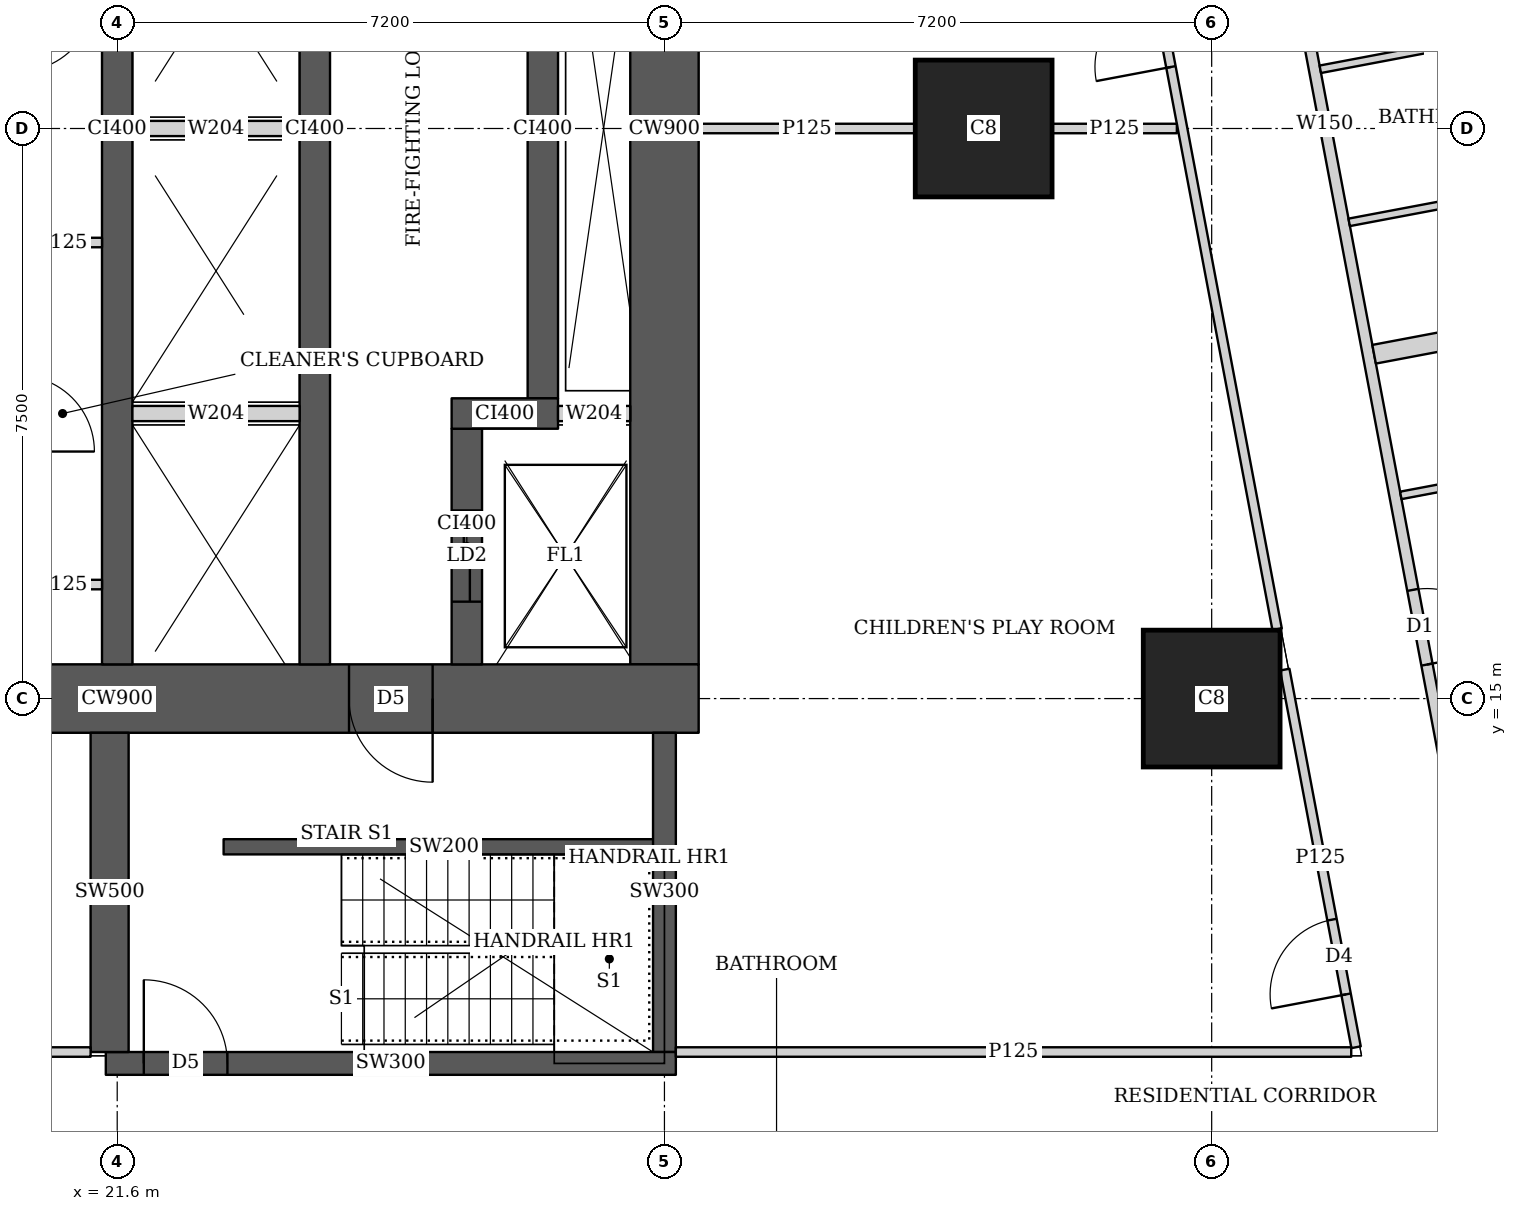
"""IFC4 building model, lengths in metres.
Left out: names, types, materials, properties, quantities, classifications, styles, units other than length and angle.
Written with IfcOpenShell. Run it as: python <this file> out.ifc"""

import sys

from ifc_helpers import new_model, si_unit, direction, frame, frame_2d, origin, origin_2d, place, context, subcontext, project, spatial, rectangle, extrude, element, fill, save


model = new_model("IFC4")
c1 = context("Model", 3, precision=1e-05, world=origin(), true_north=direction((0.0, 1.0)))
c2 = subcontext(c1, "Body", "Model", "MODEL_VIEW")
j1 = project(units=[si_unit("LENGTHUNIT", "METRE"), si_unit("PLANEANGLEUNIT", "RADIAN")], contexts=[c1])
p1 = place(None, origin())
s1 = spatial("IfcSite", under=j1, at=p1, CompositionType="ELEMENT")
p2 = place(p1, origin())
s2 = spatial("IfcBuilding", under=s1, at=p2, CompositionType="ELEMENT")
p3 = place(p2, frame((0.0, 0.0, 68.75)))
s3 = spatial("IfcBuildingStorey", under=s2, at=p3, CompositionType="ELEMENT", Elevation=68.75)
for number, where, z_axis, x_axis in (
    (1, (36.0, 15.0, 0.0), (0.0, 0.0, 1.0), (1.0, 0.0, 0.0)),
    (2, (33.0, 22.5, 0.0), (0.0, 0.0, 1.0), (1.0, 0.0, 0.0)),
):
    element("IfcColumn", number, at=place(p3, frame(where, z_axis=z_axis, x_axis=x_axis)), inside=s3, PredefinedType="COLUMN", context=c2, shape_type="SweptSolid", body=[
        extrude(rectangle(XDim=1.8, YDim=1.8, at=origin_2d()), origin(), (0.0, 0.0, 1.0), 3.75),
    ])
p4 = place(p3, frame((13.95, 15.0, 0.0), z_axis=(0.0, 0.0, 1.0), x_axis=(1.0, 0.0, 0.0)))
e3 = element("IfcWall", 3, at=p4, inside=s3, PredefinedType="SHEAR", context=c2, shape_type="SweptSolid", body=[
    extrude(rectangle(XDim=15.3, YDim=0.9, at=frame_2d((7.65, 0.0))), origin(), (0.0, 0.0, 1.0), 3.75),
])
p5 = place(p4, frame((4.45, 0.0, 0.0)))
e4 = element("IfcOpeningElement", 4, at=p5, cuts=e3, PredefinedType="OPENING", context=c2, shape_type="SweptSolid", body=[
    extrude(rectangle(XDim=1.8, YDim=2.1, at=frame_2d((0.9, 1.05))), frame((0.0, 0.46, 0.0), z_axis=(0.0, -1.0, 0.0), x_axis=(1.0, 0.0, 0.0)), (0.0, 0.0, 1.0), 0.92),
])
p6 = place(p4, frame((10.7, 0.0, 0.0)))
e5 = element("IfcOpeningElement", 5, at=p6, cuts=e3, PredefinedType="OPENING", context=c2, shape_type="SweptSolid", body=[
    extrude(rectangle(XDim=1.1, YDim=2.1, at=frame_2d((0.55, 1.05))), frame((0.0, 0.46, 0.0), z_axis=(0.0, -1.0, 0.0), x_axis=(1.0, 0.0, 0.0)), (0.0, 0.0, 1.0), 0.92),
])
p7 = place(p3, frame((28.8, 15.45, 0.0), z_axis=(0.0, 0.0, 1.0), x_axis=(0.0, 1.0, 0.0)))
e6 = element("IfcWall", 6, at=p7, inside=s3, PredefinedType="SHEAR", context=c2, shape_type="SweptSolid", body=[
    extrude(rectangle(XDim=14.1, YDim=0.9, at=frame_2d((7.05, 0.0))), origin(), (0.0, 0.0, 1.0), 3.75),
])
for number, where, z_axis, x_axis in (
    (7, (21.6, 15.45, 0.0), (0.0, 0.0, 1.0), (0.0, 1.0, 0.0)),
    (8, (24.2, 15.45, 0.0), (0.0, 0.0, 1.0), (0.0, 1.0, 0.0)),
):
    element("IfcWall", number, at=place(p3, frame(where, z_axis=z_axis, x_axis=x_axis)), inside=s3, PredefinedType="SHEAR", context=c2, shape_type="SweptSolid", body=[
        extrude(rectangle(XDim=14.1, YDim=0.4, at=frame_2d((7.05, 0.0))), origin(), (0.0, 0.0, 1.0), 3.75),
    ])
p8 = place(p3, frame((26.2, 15.45, 0.0), z_axis=(0.0, 0.0, 1.0), x_axis=(0.0, 1.0, 0.0)))
e9 = element("IfcWall", 9, at=p8, inside=s3, PredefinedType="SHEAR", context=c2, shape_type="SweptSolid", body=[
    extrude(rectangle(XDim=3.1, YDim=0.4, at=frame_2d((1.55, 0.0))), origin(), (0.0, 0.0, 1.0), 3.75),
])
p9 = place(p8, frame((0.825, 0.0, 0.0)))
e10 = element("IfcOpeningElement", 10, at=p9, cuts=e9, PredefinedType="OPENING", context=c2, shape_type="SweptSolid", body=[
    extrude(rectangle(XDim=1.2, YDim=2.1, at=frame_2d((0.6, 1.05))), frame((0.0, 0.21, 0.0), z_axis=(0.0, -1.0, 0.0), x_axis=(1.0, 0.0, 0.0)), (0.0, 0.0, 1.0), 0.42),
])
p10 = place(p3, frame((26.0, 18.75, 0.0), z_axis=(0.0, 0.0, 1.0), x_axis=(1.0, 0.0, 0.0)))
e11 = element("IfcWall", 11, at=p10, inside=s3, PredefinedType="SHEAR", context=c2, shape_type="SweptSolid", body=[
    extrude(rectangle(XDim=1.4, YDim=0.4, at=frame_2d((0.7, 0.0))), origin(), (0.0, 0.0, 1.0), 3.75),
])
p11 = place(p3, frame((27.2, 18.95, 0.0), z_axis=(0.0, 0.0, 1.0), x_axis=(0.0, 1.0, 0.0)))
e12 = element("IfcWall", 12, at=p11, inside=s3, PredefinedType="SHEAR", context=c2, shape_type="SweptSolid", body=[
    extrude(rectangle(XDim=7.1, YDim=0.4, at=frame_2d((3.55, 0.0))), origin(), (0.0, 0.0, 1.0), 3.75),
])
p12 = place(p3, frame((21.45, 10.2, 0.0), z_axis=(0.0, 0.0, 1.0), x_axis=(1.0, 0.0, 0.0)))
e13 = element("IfcWall", 13, at=p12, inside=s3, PredefinedType="SHEAR", context=c2, shape_type="SweptSolid", body=[
    extrude(rectangle(XDim=7.5, YDim=0.3, at=frame_2d((3.75, 0.0))), origin(), (0.0, 0.0, 1.0), 3.75),
])
p13 = place(p12, frame((0.5, 0.0, 0.0)))
e14 = element("IfcOpeningElement", 14, at=p13, cuts=e13, PredefinedType="OPENING", context=c2, shape_type="SweptSolid", body=[
    extrude(rectangle(XDim=1.1, YDim=2.1, at=frame_2d((0.55, 1.05))), frame((0.0, 0.16, 0.0), z_axis=(0.0, -1.0, 0.0), x_axis=(1.0, 0.0, 0.0)), (0.0, 0.0, 1.0), 0.32),
])
p14 = place(p3, frame((21.5, 10.35, 0.0), z_axis=(0.0, 0.0, 1.0), x_axis=(0.0, 1.0, 0.0)))
e15 = element("IfcWall", 15, at=p14, inside=s3, PredefinedType="SHEAR", context=c2, shape_type="SweptSolid", body=[
    extrude(rectangle(XDim=4.2, YDim=0.5, at=frame_2d((2.1, 0.0))), origin(), (0.0, 0.0, 1.0), 3.75),
])
p15 = place(p3, frame((28.8, 10.35, 0.0), z_axis=(0.0, 0.0, 1.0), x_axis=(0.0, 1.0, 0.0)))
e16 = element("IfcWall", 16, at=p15, inside=s3, PredefinedType="SHEAR", context=c2, shape_type="SweptSolid", body=[
    extrude(rectangle(XDim=4.2, YDim=0.3, at=frame_2d((2.1, 0.0))), origin(), (0.0, 0.0, 1.0), 3.75),
])
p16 = place(p3, frame((33.68, 42.723, 0.0), z_axis=(0.0, 0.0, 1.0), x_axis=(0.185624129307, -0.98262082342, 0.0)))
e17 = element("IfcWall", 17, at=p16, inside=s3, PredefinedType="SOLIDWALL", context=c2, shape_type="SweptSolid", body=[
    extrude(rectangle(XDim=41.051, YDim=0.15, at=frame_2d((20.526, 0.0))), origin(), (0.0, 0.0, 1.0), 2.45),
])
p17 = place(p16, frame((13.577, 0.0, 0.0)))
e18 = element("IfcOpeningElement", 18, at=p17, cuts=e17, PredefinedType="OPENING", context=c2, shape_type="SweptSolid", body=[
    extrude(rectangle(XDim=1.0, YDim=2.1, at=frame_2d((0.5, 1.05))), frame((0.0, 0.085, 0.0), z_axis=(0.0, -1.0, 0.0), x_axis=(1.0, 0.0, 0.0)), (0.0, 0.0, 1.0), 0.17),
])
p18 = place(p16, frame((17.394, 0.0, 0.0)))
e19 = element("IfcOpeningElement", 19, at=p18, cuts=e17, PredefinedType="OPENING", context=c2, shape_type="SweptSolid", body=[
    extrude(rectangle(XDim=1.0, YDim=2.1, at=frame_2d((0.5, 1.05))), frame((0.0, 0.085, 0.0), z_axis=(0.0, -1.0, 0.0), x_axis=(1.0, 0.0, 0.0)), (0.0, 0.0, 1.0), 0.17),
])
p19 = place(p16, frame((26.758, 0.0, 0.0)))
e20 = element("IfcOpeningElement", 20, at=p19, cuts=e17, PredefinedType="OPENING", context=c2, shape_type="SweptSolid", body=[
    extrude(rectangle(XDim=1.0, YDim=2.1, at=frame_2d((0.5, 1.05))), frame((0.0, 0.085, 0.0), z_axis=(0.0, -1.0, 0.0), x_axis=(1.0, 0.0, 0.0)), (0.0, 0.0, 1.0), 0.17),
])
p20 = place(p16, frame((32.193, 0.0, 0.0)))
e21 = element("IfcOpeningElement", 21, at=p20, cuts=e17, PredefinedType="OPENING", context=c2, shape_type="SweptSolid", body=[
    extrude(rectangle(XDim=1.0, YDim=2.1, at=frame_2d((0.5, 1.05))), frame((0.0, 0.085, 0.0), z_axis=(0.0, -1.0, 0.0), x_axis=(1.0, 0.0, 0.0)), (0.0, 0.0, 1.0), 0.17),
])
p21 = place(p3, frame((40.893, 23.934, 0.0), z_axis=(0.0, 0.0, 1.0), x_axis=(-0.982588017646, -0.185797706064, 0.0)))
e22 = element("IfcWall", 22, at=p21, inside=s3, PredefinedType="PARTITIONING", context=c2, shape_type="SweptSolid", body=[
    extrude(rectangle(XDim=3.525, YDim=0.1, at=frame_2d((1.763, 0.0))), origin(), (0.0, 0.0, 1.0), 3.45),
])
p22 = place(p3, frame((41.273, 21.919, 0.0), z_axis=(0.0, 0.0, 1.0), x_axis=(-0.982636169624, -0.185542874149, 0.0)))
e23 = element("IfcWall", 23, at=p22, inside=s3, PredefinedType="PARTITIONING", context=c2, shape_type="SweptSolid", body=[
    extrude(rectangle(XDim=3.525, YDim=0.1, at=frame_2d((1.763, 0.0))), origin(), (0.0, 0.0, 1.0), 2.45),
])
p23 = place(p3, frame((41.952, 18.327, 0.0), z_axis=(0.0, 0.0, 1.0), x_axis=(-0.982648794755, -0.185475998897, 0.0)))
e24 = element("IfcWall", 24, at=p23, inside=s3, PredefinedType="PARTITIONING", context=c2, shape_type="SweptSolid", body=[
    extrude(rectangle(XDim=3.525, YDim=0.1, at=frame_2d((1.763, 0.0))), origin(), (0.0, 0.0, 1.0), 3.45),
])
p24 = place(p3, frame((42.829, 20.416, 0.0), z_axis=(0.0, 0.0, 1.0), x_axis=(-0.982635807605, -0.185544791394, 0.0)))
e25 = element("IfcWall", 25, at=p24, inside=s3, PredefinedType="SOLIDWALL", context=c2, shape_type="SweptSolid", body=[
    extrude(rectangle(XDim=4.775, YDim=0.25, at=frame_2d((2.388, 0.0))), origin(), (0.0, 0.0, 1.0), 3.45),
])
p25 = place(p3, frame((10.413, 10.35, 0.0), z_axis=(0.0, 0.0, 1.0), x_axis=(1.0, 0.0, 0.0)))
e26 = element("IfcWall", 26, at=p25, inside=s3, PredefinedType="PARTITIONING", context=c2, shape_type="SweptSolid", body=[
    extrude(rectangle(XDim=10.837, YDim=0.125, at=frame_2d((5.418, 0.0))), origin(), (0.0, 0.0, 1.0), 3.45),
])
p26 = place(p25, frame((7.582, 0.0, 0.0)))
e27 = element("IfcOpeningElement", 27, at=p26, cuts=e26, PredefinedType="OPENING", context=c2, shape_type="SweptSolid", body=[
    extrude(rectangle(XDim=1.8, YDim=2.1, at=frame_2d((0.9, 1.05))), frame((0.0, 0.073, 0.0), z_axis=(0.0, -1.0, 0.0), x_axis=(1.0, 0.0, 0.0)), (0.0, 0.0, 1.0), 0.145),
])
p27 = place(p3, frame((28.95, 10.35, 0.0), z_axis=(0.0, 0.0, 1.0), x_axis=(1.0, 0.0, 0.0)))
e28 = element("IfcWall", 28, at=p27, inside=s3, PredefinedType="PARTITIONING", context=c2, shape_type="SweptSolid", body=[
    extrude(rectangle(XDim=8.886, YDim=0.125, at=frame_2d((4.443, 0.0))), origin(), (0.0, 0.0, 1.0), 3.45),
])
p28 = place(p3, frame((37.9, 10.413, 0.0), z_axis=(0.0, 0.0, 1.0), x_axis=(-0.185527510388, 0.982639070508, 0.0)))
e29 = element("IfcWall", 29, at=p28, inside=s3, PredefinedType="PARTITIONING", context=c2, shape_type="SweptSolid", body=[
    extrude(rectangle(XDim=5.056, YDim=0.125, at=frame_2d((2.528, 0.0))), origin(), (0.0, 0.0, 1.0), 3.45),
])
p29 = place(p28, frame((0.708, 0.0, 0.0)))
e30 = element("IfcOpeningElement", 30, at=p29, cuts=e29, PredefinedType="OPENING", context=c2, shape_type="SweptSolid", body=[
    extrude(rectangle(XDim=1.0, YDim=2.1, at=frame_2d((0.5, 1.05))), frame((0.0, 0.073, 0.0), z_axis=(0.0, -1.0, 0.0), x_axis=(1.0, 0.0, 0.0)), (0.0, 0.0, 1.0), 0.145),
])
p30 = place(p3, frame((36.861, 15.913, 0.0), z_axis=(0.0, 0.0, 1.0), x_axis=(-0.185588307143, 0.982627589808, 0.0)))
e31 = element("IfcWall", 31, at=p30, inside=s3, PredefinedType="PARTITIONING", context=c2, shape_type="SweptSolid", body=[
    extrude(rectangle(XDim=19.005, YDim=0.125, at=frame_2d((9.502, 0.0))), origin(), (0.0, 0.0, 1.0), 2.45),
])
p31 = place(p30, frame((7.527, 0.0, 0.0)))
e32 = element("IfcOpeningElement", 32, at=p31, cuts=e31, PredefinedType="OPENING", context=c2, shape_type="SweptSolid", body=[
    extrude(rectangle(XDim=1.0, YDim=2.1, at=frame_2d((0.5, 1.05))), frame((0.0, 0.073, 0.0), z_axis=(0.0, -1.0, 0.0), x_axis=(1.0, 0.0, 0.0)), (0.0, 0.0, 1.0), 0.145),
])
p32 = place(p30, frame((15.5, 0.0, 0.0)))
e33 = element("IfcOpeningElement", 33, at=p32, cuts=e31, PredefinedType="OPENING", context=c2, shape_type="SweptSolid", body=[
    extrude(rectangle(XDim=1.0, YDim=2.1, at=frame_2d((0.5, 1.05))), frame((0.0, 0.073, 0.0), z_axis=(0.0, -1.0, 0.0), x_axis=(1.0, 0.0, 0.0)), (0.0, 0.0, 1.0), 0.145),
])
p33 = place(p30, frame((17.602, 0.0, 0.0)))
e34 = element("IfcOpeningElement", 34, at=p33, cuts=e31, PredefinedType="OPENING", context=c2, shape_type="SweptSolid", body=[
    extrude(rectangle(XDim=1.0, YDim=2.1, at=frame_2d((0.5, 1.05))), frame((0.0, 0.073, 0.0), z_axis=(0.0, -1.0, 0.0), x_axis=(1.0, 0.0, 0.0)), (0.0, 0.0, 1.0), 0.145),
])
p34 = place(p3, frame((29.25, 22.5, 0.0), z_axis=(0.0, 0.0, 1.0), x_axis=(1.0, 0.0, 0.0)))
e35 = element("IfcWall", 35, at=p34, inside=s3, PredefinedType="PARTITIONING", context=c2, shape_type="SweptSolid", body=[
    extrude(rectangle(XDim=2.849, YDim=0.125, at=frame_2d((1.425, 0.0))), origin(), (0.0, 0.0, 1.0), 3.45),
])
p35 = place(p3, frame((33.901, 22.5, 0.0), z_axis=(0.0, 0.0, 1.0), x_axis=(1.0, 0.0, 0.0)))
e36 = element("IfcWall", 36, at=p35, inside=s3, PredefinedType="PARTITIONING", context=c2, shape_type="SweptSolid", body=[
    extrude(rectangle(XDim=1.641, YDim=0.125, at=frame_2d((0.821, 0.0))), origin(), (0.0, 0.0, 1.0), 2.45),
])
for number, where, z_axis, x_axis in (
    (37, (20.363, 16.5, 0.0), (0.0, 0.0, 1.0), (1.0, 0.0, 0.0)),
    (38, (20.363, 21.0, 0.0), (0.0, 0.0, 1.0), (1.0, 0.0, 0.0)),
):
    element("IfcWall", number, at=place(p3, frame(where, z_axis=z_axis, x_axis=x_axis)), inside=s3, PredefinedType="PARTITIONING", context=c2, shape_type="SweptSolid", body=[
        extrude(rectangle(XDim=1.037, YDim=0.125, at=frame_2d((0.519, 0.0))), origin(), (0.0, 0.0, 1.0), 3.45),
    ])
p36 = place(p3, frame((23.0, 13.05, 0.0), z_axis=(0.0, 0.0, 1.0), x_axis=(1.0, 0.0, 0.0)))
e39 = element("IfcWall", 39, at=p36, inside=s3, PredefinedType="SHEAR", context=c2, shape_type="SweptSolid", body=[
    extrude(rectangle(XDim=5.8, YDim=0.2, at=frame_2d((2.9, 0.0))), origin(), (0.0, 0.0, 1.0), 3.75),
])
for number, where, z_axis, x_axis in (
    (40, (21.8, 18.75, 0.0), (0.0, 0.0, 1.0), (1.0, 0.0, 0.0)),
    (41, (21.8, 22.5, 0.0), (0.0, 0.0, 1.0), (1.0, 0.0, 0.0)),
):
    element("IfcWall", number, at=place(p3, frame(where, z_axis=z_axis, x_axis=x_axis)), inside=s3, PredefinedType="SOLIDWALL", context=c2, shape_type="SweptSolid", body=[
        extrude(rectangle(XDim=2.2, YDim=0.2, at=frame_2d((1.1, 0.0))), origin(), (0.0, 0.0, 1.0), 3.45),
    ])
p37 = place(p3, frame((27.4, 18.75, 0.0), z_axis=(0.0, 0.0, 1.0), x_axis=(1.0, 0.0, 0.0)))
e42 = element("IfcWall", 42, at=p37, inside=s3, PredefinedType="SOLIDWALL", context=c2, shape_type="SweptSolid", body=[
    extrude(rectangle(XDim=0.95, YDim=0.2, at=frame_2d((0.475, 0.0))), origin(), (0.0, 0.0, 1.0), 3.45),
])
p38 = place(p19, origin())
e43 = element("IfcDoor", 43, at=p38, inside=s3, OperationType="SINGLE_SWING_RIGHT", PredefinedType="DOOR", context=c2, shape_type="SweptSolid", body=[
    extrude(rectangle(XDim=1.0, YDim=2.1, at=frame_2d((0.5, 1.05))), frame((0.0, 0.025, 0.0), z_axis=(0.0, -1.0, 0.0), x_axis=(1.0, 0.0, 0.0)), (0.0, 0.0, 1.0), 0.05),
])
fill(e20, e43)
p39 = place(p29, origin())
e44 = element("IfcDoor", 44, at=p39, inside=s3, OperationType="SINGLE_SWING_LEFT", PredefinedType="DOOR", context=c2, shape_type="SweptSolid", body=[
    extrude(rectangle(XDim=1.0, YDim=2.1, at=frame_2d((0.5, 1.05))), frame((0.0, 0.025, 0.0), z_axis=(0.0, -1.0, 0.0), x_axis=(1.0, 0.0, 0.0)), (0.0, 0.0, 1.0), 0.05),
])
fill(e30, e44)
p40 = place(p31, origin())
e45 = element("IfcDoor", 45, at=p40, inside=s3, OperationType="SINGLE_SWING_LEFT", PredefinedType="DOOR", context=c2, shape_type="SweptSolid", body=[
    extrude(rectangle(XDim=1.0, YDim=2.1, at=frame_2d((0.5, 1.05))), frame((0.0, 0.025, 0.0), z_axis=(0.0, -1.0, 0.0), x_axis=(1.0, 0.0, 0.0)), (0.0, 0.0, 1.0), 0.05),
])
fill(e32, e45)
p41 = place(p6, origin())
e46 = element("IfcDoor", 46, at=p41, inside=s3, OperationType="SINGLE_SWING_LEFT", PredefinedType="DOOR", context=c2, shape_type="SweptSolid", body=[
    extrude(rectangle(XDim=1.1, YDim=2.1, at=frame_2d((0.55, 1.05))), frame((0.0, 0.025, 0.0), z_axis=(0.0, -1.0, 0.0), x_axis=(1.0, 0.0, 0.0)), (0.0, 0.0, 1.0), 0.05),
])
fill(e5, e46)
p42 = place(p9, origin())
e47 = element("IfcDoor", 47, at=p42, inside=s3, OperationType="DOUBLE_DOOR_SLIDING", PredefinedType="DOOR", context=c2, shape_type="SweptSolid", body=[
    extrude(rectangle(XDim=1.2, YDim=2.1, at=frame_2d((0.6, 1.05))), frame((0.0, 0.025, 0.0), z_axis=(0.0, -1.0, 0.0), x_axis=(1.0, 0.0, 0.0)), (0.0, 0.0, 1.0), 0.05),
])
fill(e10, e47)
p43 = place(p13, origin())
e48 = element("IfcDoor", 48, at=p43, inside=s3, OperationType="SINGLE_SWING_LEFT", PredefinedType="DOOR", context=c2, shape_type="SweptSolid", body=[
    extrude(rectangle(XDim=1.1, YDim=2.1, at=frame_2d((0.55, 1.05))), frame((0.0, 0.025, 0.0), z_axis=(0.0, -1.0, 0.0), x_axis=(1.0, 0.0, 0.0)), (0.0, 0.0, 1.0), 0.05),
])
fill(e14, e48)
save(model, sys.argv[1])
